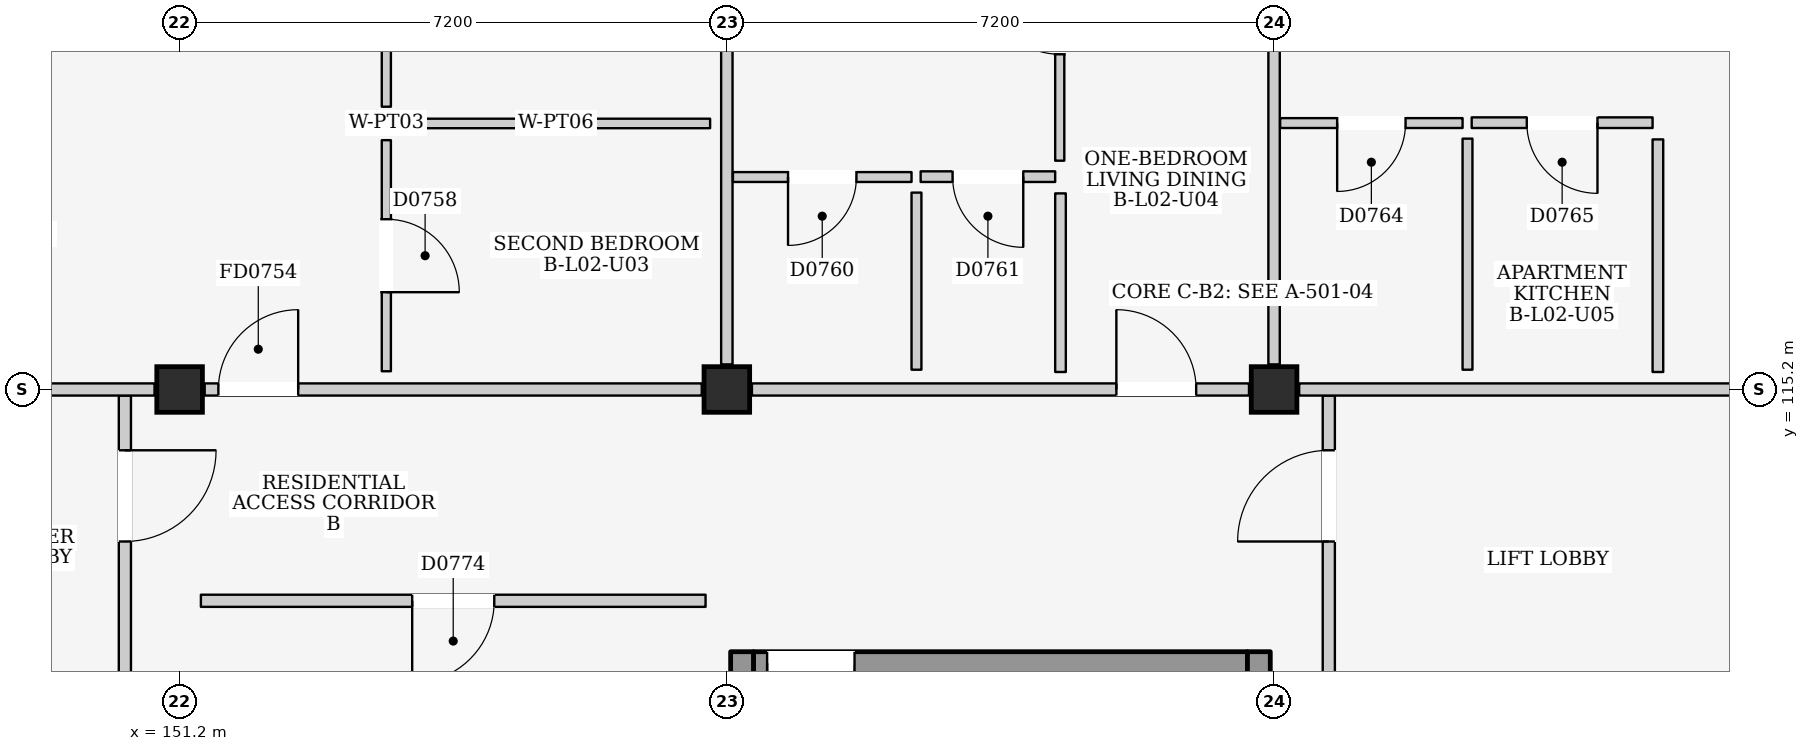
"""IFC4 building model, lengths in metres.
Left out: names, types, materials, properties, quantities, classifications, styles, units other than length and angle.
Written with IfcOpenShell. Run it as: python <this file> out.ifc"""

import sys

from ifc_helpers import new_model, si_unit, direction, frame, frame_2d, origin, origin_2d, place, context, subcontext, project, spatial, rectangle, extrude, element, fill, save


model = new_model("IFC4")
c1 = context("Model", 3, precision=1e-05, world=origin(), true_north=direction((0.0, 1.0)))
c2 = subcontext(c1, "Body", "Model", "MODEL_VIEW")
j1 = project(units=[si_unit("LENGTHUNIT", "METRE"), si_unit("PLANEANGLEUNIT", "RADIAN")], contexts=[c1])
p1 = place(None, origin())
s1 = spatial("IfcSite", under=j1, at=p1, CompositionType="ELEMENT")
p2 = place(p1, origin())
s2 = spatial("IfcBuilding", under=s1, at=p2, CompositionType="ELEMENT")
p3 = place(p2, frame((0.0, 0.0, 9.0)))
s3 = spatial("IfcBuildingStorey", under=s2, at=p3, CompositionType="ELEMENT", Elevation=9.0)
for number, where, z_axis, x_axis in (
    (1, (151.2, 115.2, 0.0), (0.0, 0.0, 1.0), (1.0, 0.0, 0.0)),
    (2, (158.4, 115.2, 0.0), (0.0, 0.0, 1.0), (1.0, 0.0, 0.0)),
    (3, (165.6, 115.2, 0.0), (0.0, 0.0, 1.0), (1.0, 0.0, 0.0)),
):
    element("IfcColumn", number, at=place(p3, frame(where, z_axis=z_axis, x_axis=x_axis)), inside=s3, PredefinedType="COLUMN", context=c2, shape_type="SweptSolid", body=[
        extrude(rectangle(XDim=0.6, YDim=0.6, at=origin_2d()), origin(), (0.0, 0.0, 1.0), 3.2),
    ])
p4 = place(p3, frame((150.48, 111.1, 0.0), z_axis=(0.0, 0.0, 1.0), x_axis=(0.0, 1.0, 0.0)))
e4 = element("IfcWall", 4, at=p4, inside=s3, PredefinedType="PARTITIONING", context=c2, shape_type="SweptSolid", body=[
    extrude(rectangle(XDim=4.02, YDim=0.16, at=frame_2d((2.01, 0.0))), origin(), (0.0, 0.0, 1.0), 2.96),
])
p5 = place(p4, frame((2.1, 0.0, 0.0)))
e5 = element("IfcOpeningElement", 5, at=p5, cuts=e4, PredefinedType="OPENING", context=c2, shape_type="SweptSolid", body=[
    extrude(rectangle(XDim=1.2, YDim=2.2, at=frame_2d((0.6, 1.1))), frame((0.0, 0.095, 0.0), z_axis=(0.0, -1.0, 0.0), x_axis=(1.0, 0.0, 0.0)), (0.0, 0.0, 1.0), 0.19),
])
p6 = place(p3, frame((158.75, 111.6, 0.0), z_axis=(0.0, 0.0, 1.0), x_axis=(1.0, 0.0, 0.0)))
e6 = element("IfcWall", 6, at=p6, inside=s3, PredefinedType="SHEAR", context=c2, shape_type="SweptSolid", body=[
    extrude(rectangle(XDim=6.5, YDim=0.3, at=frame_2d((3.25, 0.0))), origin(), (0.0, 0.0, 1.0), 2.96),
])
p7 = place(p6, frame((0.18, 0.0, 0.0)))
e7 = element("IfcOpeningElement", 7, at=p7, cuts=e6, PredefinedType="OPENING", context=c2, shape_type="SweptSolid", body=[
    extrude(rectangle(XDim=1.15, YDim=2.2, at=frame_2d((0.575, 1.1))), frame((0.0, 0.165, 0.0), z_axis=(0.0, -1.0, 0.0), x_axis=(1.0, 0.0, 0.0)), (0.0, 0.0, 1.0), 0.33),
])
for number, where, z_axis, x_axis in (
    (8, (158.6, 108.15, 0.0), (0.0, 0.0, 1.0), (0.0, 1.0, 0.0)),
    (9, (165.4, 108.15, 0.0), (0.0, 0.0, 1.0), (0.0, 1.0, 0.0)),
):
    element("IfcWall", number, at=place(p3, frame(where, z_axis=z_axis, x_axis=x_axis)), inside=s3, PredefinedType="SHEAR", context=c2, shape_type="SweptSolid", body=[
        extrude(rectangle(XDim=3.6, YDim=0.3, at=frame_2d((1.8, 0.0))), origin(), (0.0, 0.0, 1.0), 2.96),
    ])
p8 = place(p3, frame((166.32, 110.8, 0.0), z_axis=(0.0, 0.0, 1.0), x_axis=(0.0, 1.0, 0.0)))
e10 = element("IfcWall", 10, at=p8, inside=s3, PredefinedType="PARTITIONING", context=c2, shape_type="SweptSolid", body=[
    extrude(rectangle(XDim=4.32, YDim=0.16, at=frame_2d((2.16, 0.0))), origin(), (0.0, 0.0, 1.0), 2.96),
])
p9 = place(p8, frame((2.4, 0.0, 0.0)))
e11 = element("IfcOpeningElement", 11, at=p9, cuts=e10, PredefinedType="OPENING", context=c2, shape_type="SweptSolid", body=[
    extrude(rectangle(XDim=1.2, YDim=2.2, at=frame_2d((0.6, 1.1))), frame((0.0, 0.095, 0.0), z_axis=(0.0, -1.0, 0.0), x_axis=(1.0, 0.0, 0.0)), (0.0, 0.0, 1.0), 0.19),
])
p10 = place(p3, frame((144.33, 115.2, 0.0), z_axis=(0.0, 0.0, 1.0), x_axis=(1.0, 0.0, 0.0)))
e12 = element("IfcWall", 12, at=p10, inside=s3, PredefinedType="PARTITIONING", context=c2, shape_type="SweptSolid", body=[
    extrude(rectangle(XDim=6.54, YDim=0.16, at=frame_2d((3.27, 0.0))), origin(), (0.0, 0.0, 1.0), 2.345),
])
p11 = place(p3, frame((151.53, 115.2, 0.0), z_axis=(0.0, 0.0, 1.0), x_axis=(1.0, 0.0, 0.0)))
e13 = element("IfcWall", 13, at=p11, inside=s3, PredefinedType="PARTITIONING", context=c2, shape_type="SweptSolid", body=[
    extrude(rectangle(XDim=6.54, YDim=0.16, at=frame_2d((3.27, 0.0))), origin(), (0.0, 0.0, 1.0), 2.345),
])
p12 = place(p11, frame((0.18, 0.0, 0.0)))
e14 = element("IfcOpeningElement", 14, at=p12, cuts=e13, PredefinedType="OPENING", context=c2, shape_type="SweptSolid", body=[
    extrude(rectangle(XDim=1.05, YDim=2.15, at=frame_2d((0.525, 1.075))), frame((0.0, 0.095, 0.0), z_axis=(0.0, -1.0, 0.0), x_axis=(1.0, 0.0, 0.0)), (0.0, 0.0, 1.0), 0.19),
])
p13 = place(p3, frame((158.4, 115.53, 0.0), z_axis=(0.0, 0.0, 1.0), x_axis=(0.0, 1.0, 0.0)))
e15 = element("IfcWall", 15, at=p13, inside=s3, PredefinedType="PARTITIONING", context=c2, shape_type="SweptSolid", body=[
    extrude(rectangle(XDim=6.54, YDim=0.15, at=frame_2d((3.27, 0.0))), origin(), (0.0, 0.0, 1.0), 2.395),
])
p14 = place(p3, frame((153.92, 118.92, 0.0), z_axis=(0.0, 0.0, 1.0), x_axis=(0.0, 1.0, 0.0)))
e16 = element("IfcWall", 16, at=p14, inside=s3, PredefinedType="PARTITIONING", context=c2, shape_type="SweptSolid", body=[
    extrude(rectangle(XDim=3.04, YDim=0.12, at=frame_2d((1.52, 0.0))), origin(), (0.0, 0.0, 1.0), 2.96),
])
p15 = place(p14, frame((1.045, 0.0, 0.0)))
e17 = element("IfcOpeningElement", 17, at=p15, cuts=e16, PredefinedType="OPENING", context=c2, shape_type="SweptSolid", body=[
    extrude(rectangle(XDim=0.95, YDim=2.15, at=frame_2d((0.475, 1.075))), frame((0.0, 0.075, 0.0), z_axis=(0.0, -1.0, 0.0), x_axis=(1.0, 0.0, 0.0)), (0.0, 0.0, 1.0), 0.15),
])
p16 = place(p3, frame((154.12, 118.7, 0.0), z_axis=(0.0, 0.0, 1.0), x_axis=(1.0, 0.0, 0.0)))
e18 = element("IfcWall", 18, at=p16, inside=s3, PredefinedType="PARTITIONING", context=c2, shape_type="SweptSolid", body=[
    extrude(rectangle(XDim=4.06, YDim=0.125, at=frame_2d((2.03, 0.0))), origin(), (0.0, 0.0, 1.0), 2.96),
])
p17 = place(p3, frame((153.92, 115.44, 0.0), z_axis=(0.0, 0.0, 1.0), x_axis=(0.0, 1.0, 0.0)))
e19 = element("IfcWall", 19, at=p17, inside=s3, PredefinedType="PARTITIONING", context=c2, shape_type="SweptSolid", body=[
    extrude(rectangle(XDim=3.04, YDim=0.12, at=frame_2d((1.52, 0.0))), origin(), (0.0, 0.0, 1.0), 2.96),
])
p18 = place(p17, frame((1.04, 0.0, 0.0)))
e20 = element("IfcOpeningElement", 20, at=p18, cuts=e19, PredefinedType="OPENING", context=c2, shape_type="SweptSolid", body=[
    extrude(rectangle(XDim=0.96, YDim=2.15, at=frame_2d((0.48, 1.075))), frame((0.0, 0.075, 0.0), z_axis=(0.0, -1.0, 0.0), x_axis=(1.0, 0.0, 0.0)), (0.0, 0.0, 1.0), 0.15),
])
p19 = place(p3, frame((158.73, 115.2, 0.0), z_axis=(0.0, 0.0, 1.0), x_axis=(1.0, 0.0, 0.0)))
e21 = element("IfcWall", 21, at=p19, inside=s3, PredefinedType="PARTITIONING", context=c2, shape_type="SweptSolid", body=[
    extrude(rectangle(XDim=6.54, YDim=0.16, at=frame_2d((3.27, 0.0))), origin(), (0.0, 0.0, 1.0), 2.345),
])
p20 = place(p19, frame((4.795, 0.0, 0.0)))
e22 = element("IfcOpeningElement", 22, at=p20, cuts=e21, PredefinedType="OPENING", context=c2, shape_type="SweptSolid", body=[
    extrude(rectangle(XDim=1.05, YDim=2.15, at=frame_2d((0.525, 1.075))), frame((0.0, 0.095, 0.0), z_axis=(0.0, -1.0, 0.0), x_axis=(1.0, 0.0, 0.0)), (0.0, 0.0, 1.0), 0.19),
])
p21 = place(p3, frame((165.6, 115.53, 0.0), z_axis=(0.0, 0.0, 1.0), x_axis=(0.0, 1.0, 0.0)))
e23 = element("IfcWall", 23, at=p21, inside=s3, PredefinedType="PARTITIONING", context=c2, shape_type="SweptSolid", body=[
    extrude(rectangle(XDim=6.54, YDim=0.15, at=frame_2d((3.27, 0.0))), origin(), (0.0, 0.0, 1.0), 2.395),
])
p22 = place(p3, frame((158.48, 117.995, 0.0), z_axis=(0.0, 0.0, 1.0), x_axis=(1.0, 0.0, 0.0)))
e24 = element("IfcWall", 24, at=p22, inside=s3, PredefinedType="PARTITIONING", context=c2, shape_type="SweptSolid", body=[
    extrude(rectangle(XDim=2.35, YDim=0.13, at=frame_2d((1.175, 0.0))), origin(), (0.0, 0.0, 1.0), 2.96),
])
p23 = place(p22, frame((0.725, 0.0, 0.0)))
e25 = element("IfcOpeningElement", 25, at=p23, cuts=e24, PredefinedType="OPENING", context=c2, shape_type="SweptSolid", body=[
    extrude(rectangle(XDim=0.9, YDim=2.1, at=frame_2d((0.45, 1.05))), frame((0.0, 0.08, 0.0), z_axis=(0.0, -1.0, 0.0), x_axis=(1.0, 0.0, 0.0)), (0.0, 0.0, 1.0), 0.16),
])
p24 = place(p3, frame((160.895, 115.46, 0.0), z_axis=(0.0, 0.0, 1.0), x_axis=(0.0, 1.0, 0.0)))
e26 = element("IfcWall", 26, at=p24, inside=s3, PredefinedType="PARTITIONING", context=c2, shape_type="SweptSolid", body=[
    extrude(rectangle(XDim=2.33, YDim=0.13, at=frame_2d((1.165, 0.0))), origin(), (0.0, 0.0, 1.0), 2.96),
])
p25 = place(p3, frame((160.95, 118.0, 0.0), z_axis=(0.0, 0.0, 1.0), x_axis=(1.0, 0.0, 0.0)))
e27 = element("IfcWall", 27, at=p25, inside=s3, PredefinedType="PARTITIONING", context=c2, shape_type="SweptSolid", body=[
    extrude(rectangle(XDim=1.77, YDim=0.14, at=frame_2d((0.885, 0.0))), origin(), (0.0, 0.0, 1.0), 2.96),
])
p26 = place(p25, frame((0.42, 0.0, 0.0)))
e28 = element("IfcOpeningElement", 28, at=p26, cuts=e27, PredefinedType="OPENING", context=c2, shape_type="SweptSolid", body=[
    extrude(rectangle(XDim=0.93, YDim=2.14, at=frame_2d((0.465, 1.07))), frame((0.0, 0.085, 0.0), z_axis=(0.0, -1.0, 0.0), x_axis=(1.0, 0.0, 0.0)), (0.0, 0.0, 1.0), 0.17),
])
p27 = place(p3, frame((162.79, 115.43, 0.0), z_axis=(0.0, 0.0, 1.0), x_axis=(0.0, 1.0, 0.0)))
e29 = element("IfcWall", 29, at=p27, inside=s3, PredefinedType="PARTITIONING", context=c2, shape_type="SweptSolid", body=[
    extrude(rectangle(XDim=2.35, YDim=0.14, at=frame_2d((1.175, 0.0))), origin(), (0.0, 0.0, 1.0), 2.96),
])
p28 = place(p3, frame((162.78, 118.21, 0.0), z_axis=(0.0, 0.0, 1.0), x_axis=(0.0, 1.0, 0.0)))
e30 = element("IfcWall", 30, at=p28, inside=s3, PredefinedType="PARTITIONING", context=c2, shape_type="SweptSolid", body=[
    extrude(rectangle(XDim=3.75, YDim=0.12, at=frame_2d((1.875, 0.0))), origin(), (0.0, 0.0, 1.0), 2.96),
])
p29 = place(p28, frame((1.4, 0.0, 0.0)))
e31 = element("IfcOpeningElement", 31, at=p29, cuts=e30, PredefinedType="OPENING", context=c2, shape_type="SweptSolid", body=[
    extrude(rectangle(XDim=0.95, YDim=2.15, at=frame_2d((0.475, 1.075))), frame((0.0, 0.075, 0.0), z_axis=(0.0, -1.0, 0.0), x_axis=(1.0, 0.0, 0.0)), (0.0, 0.0, 1.0), 0.15),
])
p30 = place(p3, frame((165.93, 115.2, 0.0), z_axis=(0.0, 0.0, 1.0), x_axis=(1.0, 0.0, 0.0)))
e32 = element("IfcWall", 32, at=p30, inside=s3, PredefinedType="PARTITIONING", context=c2, shape_type="SweptSolid", body=[
    extrude(rectangle(XDim=6.54, YDim=0.16, at=frame_2d((3.27, 0.0))), origin(), (0.0, 0.0, 1.0), 2.345),
])
p31 = place(p3, frame((165.68, 118.705, 0.0), z_axis=(0.0, 0.0, 1.0), x_axis=(1.0, 0.0, 0.0)))
e33 = element("IfcWall", 33, at=p31, inside=s3, PredefinedType="PARTITIONING", context=c2, shape_type="SweptSolid", body=[
    extrude(rectangle(XDim=2.4, YDim=0.13, at=frame_2d((1.2, 0.0))), origin(), (0.0, 0.0, 1.0), 2.96),
])
p32 = place(p31, frame((0.75, 0.0, 0.0)))
e34 = element("IfcOpeningElement", 34, at=p32, cuts=e33, PredefinedType="OPENING", context=c2, shape_type="SweptSolid", body=[
    extrude(rectangle(XDim=0.9, YDim=2.1, at=frame_2d((0.45, 1.05))), frame((0.0, 0.08, 0.0), z_axis=(0.0, -1.0, 0.0), x_axis=(1.0, 0.0, 0.0)), (0.0, 0.0, 1.0), 0.16),
])
p33 = place(p3, frame((168.145, 115.46, 0.0), z_axis=(0.0, 0.0, 1.0), x_axis=(0.0, 1.0, 0.0)))
e35 = element("IfcWall", 35, at=p33, inside=s3, PredefinedType="PARTITIONING", context=c2, shape_type="SweptSolid", body=[
    extrude(rectangle(XDim=3.04, YDim=0.13, at=frame_2d((1.52, 0.0))), origin(), (0.0, 0.0, 1.0), 2.96),
])
p34 = place(p3, frame((168.2, 118.71, 0.0), z_axis=(0.0, 0.0, 1.0), x_axis=(1.0, 0.0, 0.0)))
e36 = element("IfcWall", 36, at=p34, inside=s3, PredefinedType="PARTITIONING", context=c2, shape_type="SweptSolid", body=[
    extrude(rectangle(XDim=2.38, YDim=0.14, at=frame_2d((1.19, 0.0))), origin(), (0.0, 0.0, 1.0), 2.96),
])
p35 = place(p34, frame((0.725, 0.0, 0.0)))
e37 = element("IfcOpeningElement", 37, at=p35, cuts=e36, PredefinedType="OPENING", context=c2, shape_type="SweptSolid", body=[
    extrude(rectangle(XDim=0.93, YDim=2.14, at=frame_2d((0.465, 1.07))), frame((0.0, 0.085, 0.0), z_axis=(0.0, -1.0, 0.0), x_axis=(1.0, 0.0, 0.0)), (0.0, 0.0, 1.0), 0.17),
])
p36 = place(p3, frame((170.65, 115.43, 0.0), z_axis=(0.0, 0.0, 1.0), x_axis=(0.0, 1.0, 0.0)))
e38 = element("IfcWall", 38, at=p36, inside=s3, PredefinedType="PARTITIONING", context=c2, shape_type="SweptSolid", body=[
    extrude(rectangle(XDim=3.06, YDim=0.14, at=frame_2d((1.53, 0.0))), origin(), (0.0, 0.0, 1.0), 2.96),
])
p37 = place(p3, frame((151.48, 112.42, 0.0), z_axis=(0.0, 0.0, 1.0), x_axis=(1.0, 0.0, 0.0)))
e39 = element("IfcWall", 39, at=p37, inside=s3, PredefinedType="PARTITIONING", context=c2, shape_type="SweptSolid", body=[
    extrude(rectangle(XDim=6.64, YDim=0.16, at=frame_2d((3.32, 0.0))), origin(), (0.0, 0.0, 1.0), 2.96),
])
p38 = place(p37, frame((2.78, 0.0, 0.0)))
e40 = element("IfcOpeningElement", 40, at=p38, cuts=e39, PredefinedType="OPENING", context=c2, shape_type="SweptSolid", body=[
    extrude(rectangle(XDim=1.08, YDim=2.22, at=frame_2d((0.54, 1.11))), frame((0.0, 0.095, 0.0), z_axis=(0.0, -1.0, 0.0), x_axis=(1.0, 0.0, 0.0)), (0.0, 0.0, 1.0), 0.19),
])
p39 = place(p5, frame((1.2, 0.0, 0.0), z_axis=(0.0, 0.0, 1.0), x_axis=(-1.0, 0.0, 0.0)))
e41 = element("IfcDoor", 41, at=p39, inside=s3, OperationType="SINGLE_SWING_LEFT", PredefinedType="DOOR", context=c2, shape_type="SweptSolid", body=[
    extrude(rectangle(XDim=1.2, YDim=2.2, at=frame_2d((0.6, 1.1))), frame((0.0, 0.025, 0.0), z_axis=(0.0, -1.0, 0.0), x_axis=(1.0, 0.0, 0.0)), (0.0, 0.0, 1.0), 0.05),
])
fill(e5, e41)
p40 = place(p7, frame((1.15, 0.0, 0.0), z_axis=(0.0, 0.0, 1.0), x_axis=(-1.0, 0.0, 0.0)))
e42 = element("IfcDoor", 42, at=p40, inside=s3, OperationType="SINGLE_SWING_RIGHT", PredefinedType="DOOR", context=c2, shape_type="SweptSolid", body=[
    extrude(rectangle(XDim=1.15, YDim=2.2, at=frame_2d((0.575, 1.1))), frame((0.0, 0.025, 0.0), z_axis=(0.0, -1.0, 0.0), x_axis=(1.0, 0.0, 0.0)), (0.0, 0.0, 1.0), 0.05),
])
fill(e7, e42)
p41 = place(p9, origin())
e43 = element("IfcDoor", 43, at=p41, inside=s3, OperationType="SINGLE_SWING_LEFT", PredefinedType="DOOR", context=c2, shape_type="SweptSolid", body=[
    extrude(rectangle(XDim=1.2, YDim=2.2, at=frame_2d((0.6, 1.1))), frame((0.0, 0.025, 0.0), z_axis=(0.0, -1.0, 0.0), x_axis=(1.0, 0.0, 0.0)), (0.0, 0.0, 1.0), 0.05),
])
fill(e11, e43)
p42 = place(p12, origin())
e44 = element("IfcDoor", 44, at=p42, inside=s3, OperationType="SINGLE_SWING_RIGHT", PredefinedType="DOOR", context=c2, shape_type="SweptSolid", body=[
    extrude(rectangle(XDim=1.05, YDim=2.15, at=frame_2d((0.525, 1.075))), frame((0.0, 0.025, 0.0), z_axis=(0.0, -1.0, 0.0), x_axis=(1.0, 0.0, 0.0)), (0.0, 0.0, 1.0), 0.05),
])
fill(e14, e44)
p43 = place(p18, frame((0.96, 0.0, 0.0), z_axis=(0.0, 0.0, 1.0), x_axis=(-1.0, 0.0, 0.0)))
e45 = element("IfcDoor", 45, at=p43, inside=s3, OperationType="SINGLE_SWING_RIGHT", PredefinedType="DOOR", context=c2, shape_type="SweptSolid", body=[
    extrude(rectangle(XDim=0.96, YDim=2.15, at=frame_2d((0.48, 1.075))), frame((0.0, 0.025, 0.0), z_axis=(0.0, -1.0, 0.0), x_axis=(1.0, 0.0, 0.0)), (0.0, 0.0, 1.0), 0.05),
])
fill(e20, e45)
p44 = place(p20, origin())
e46 = element("IfcDoor", 46, at=p44, inside=s3, OperationType="SINGLE_SWING_LEFT", PredefinedType="DOOR", context=c2, shape_type="SweptSolid", body=[
    extrude(rectangle(XDim=1.05, YDim=2.15, at=frame_2d((0.525, 1.075))), frame((0.0, 0.025, 0.0), z_axis=(0.0, -1.0, 0.0), x_axis=(1.0, 0.0, 0.0)), (0.0, 0.0, 1.0), 0.05),
])
fill(e22, e46)
p45 = place(p23, frame((0.9, 0.0, 0.0), z_axis=(0.0, 0.0, 1.0), x_axis=(-1.0, 0.0, 0.0)))
e47 = element("IfcDoor", 47, at=p45, inside=s3, OperationType="SINGLE_SWING_RIGHT", PredefinedType="DOOR", context=c2, shape_type="SweptSolid", body=[
    extrude(rectangle(XDim=0.9, YDim=2.1, at=frame_2d((0.45, 1.05))), frame((0.0, 0.025, 0.0), z_axis=(0.0, -1.0, 0.0), x_axis=(1.0, 0.0, 0.0)), (0.0, 0.0, 1.0), 0.05),
])
fill(e25, e47)
p46 = place(p26, frame((0.93, 0.0, 0.0), z_axis=(0.0, 0.0, 1.0), x_axis=(-1.0, 0.0, 0.0)))
e48 = element("IfcDoor", 48, at=p46, inside=s3, OperationType="SINGLE_SWING_LEFT", PredefinedType="DOOR", context=c2, shape_type="SweptSolid", body=[
    extrude(rectangle(XDim=0.93, YDim=2.14, at=frame_2d((0.465, 1.07))), frame((0.0, 0.025, 0.0), z_axis=(0.0, -1.0, 0.0), x_axis=(1.0, 0.0, 0.0)), (0.0, 0.0, 1.0), 0.05),
])
fill(e28, e48)
p47 = place(p29, origin())
e49 = element("IfcDoor", 49, at=p47, inside=s3, OperationType="SINGLE_SWING_RIGHT", PredefinedType="DOOR", context=c2, shape_type="SweptSolid", body=[
    extrude(rectangle(XDim=0.95, YDim=2.15, at=frame_2d((0.475, 1.075))), frame((0.0, 0.025, 0.0), z_axis=(0.0, -1.0, 0.0), x_axis=(1.0, 0.0, 0.0)), (0.0, 0.0, 1.0), 0.05),
])
fill(e31, e49)
p48 = place(p32, frame((0.9, 0.0, 0.0), z_axis=(0.0, 0.0, 1.0), x_axis=(-1.0, 0.0, 0.0)))
e50 = element("IfcDoor", 50, at=p48, inside=s3, OperationType="SINGLE_SWING_RIGHT", PredefinedType="DOOR", context=c2, shape_type="SweptSolid", body=[
    extrude(rectangle(XDim=0.9, YDim=2.1, at=frame_2d((0.45, 1.05))), frame((0.0, 0.025, 0.0), z_axis=(0.0, -1.0, 0.0), x_axis=(1.0, 0.0, 0.0)), (0.0, 0.0, 1.0), 0.05),
])
fill(e34, e50)
p49 = place(p35, frame((0.93, 0.0, 0.0), z_axis=(0.0, 0.0, 1.0), x_axis=(-1.0, 0.0, 0.0)))
e51 = element("IfcDoor", 51, at=p49, inside=s3, OperationType="SINGLE_SWING_LEFT", PredefinedType="DOOR", context=c2, shape_type="SweptSolid", body=[
    extrude(rectangle(XDim=0.93, YDim=2.14, at=frame_2d((0.465, 1.07))), frame((0.0, 0.025, 0.0), z_axis=(0.0, -1.0, 0.0), x_axis=(1.0, 0.0, 0.0)), (0.0, 0.0, 1.0), 0.05),
])
fill(e37, e51)
p50 = place(p38, frame((1.08, 0.0, 0.0), z_axis=(0.0, 0.0, 1.0), x_axis=(-1.0, 0.0, 0.0)))
e52 = element("IfcDoor", 52, at=p50, inside=s3, OperationType="SINGLE_SWING_RIGHT", PredefinedType="DOOR", context=c2, shape_type="SweptSolid", body=[
    extrude(rectangle(XDim=1.08, YDim=2.22, at=frame_2d((0.54, 1.11))), frame((0.0, 0.025, 0.0), z_axis=(0.0, -1.0, 0.0), x_axis=(1.0, 0.0, 0.0)), (0.0, 0.0, 1.0), 0.05),
])
fill(e40, e52)
save(model, sys.argv[1])
